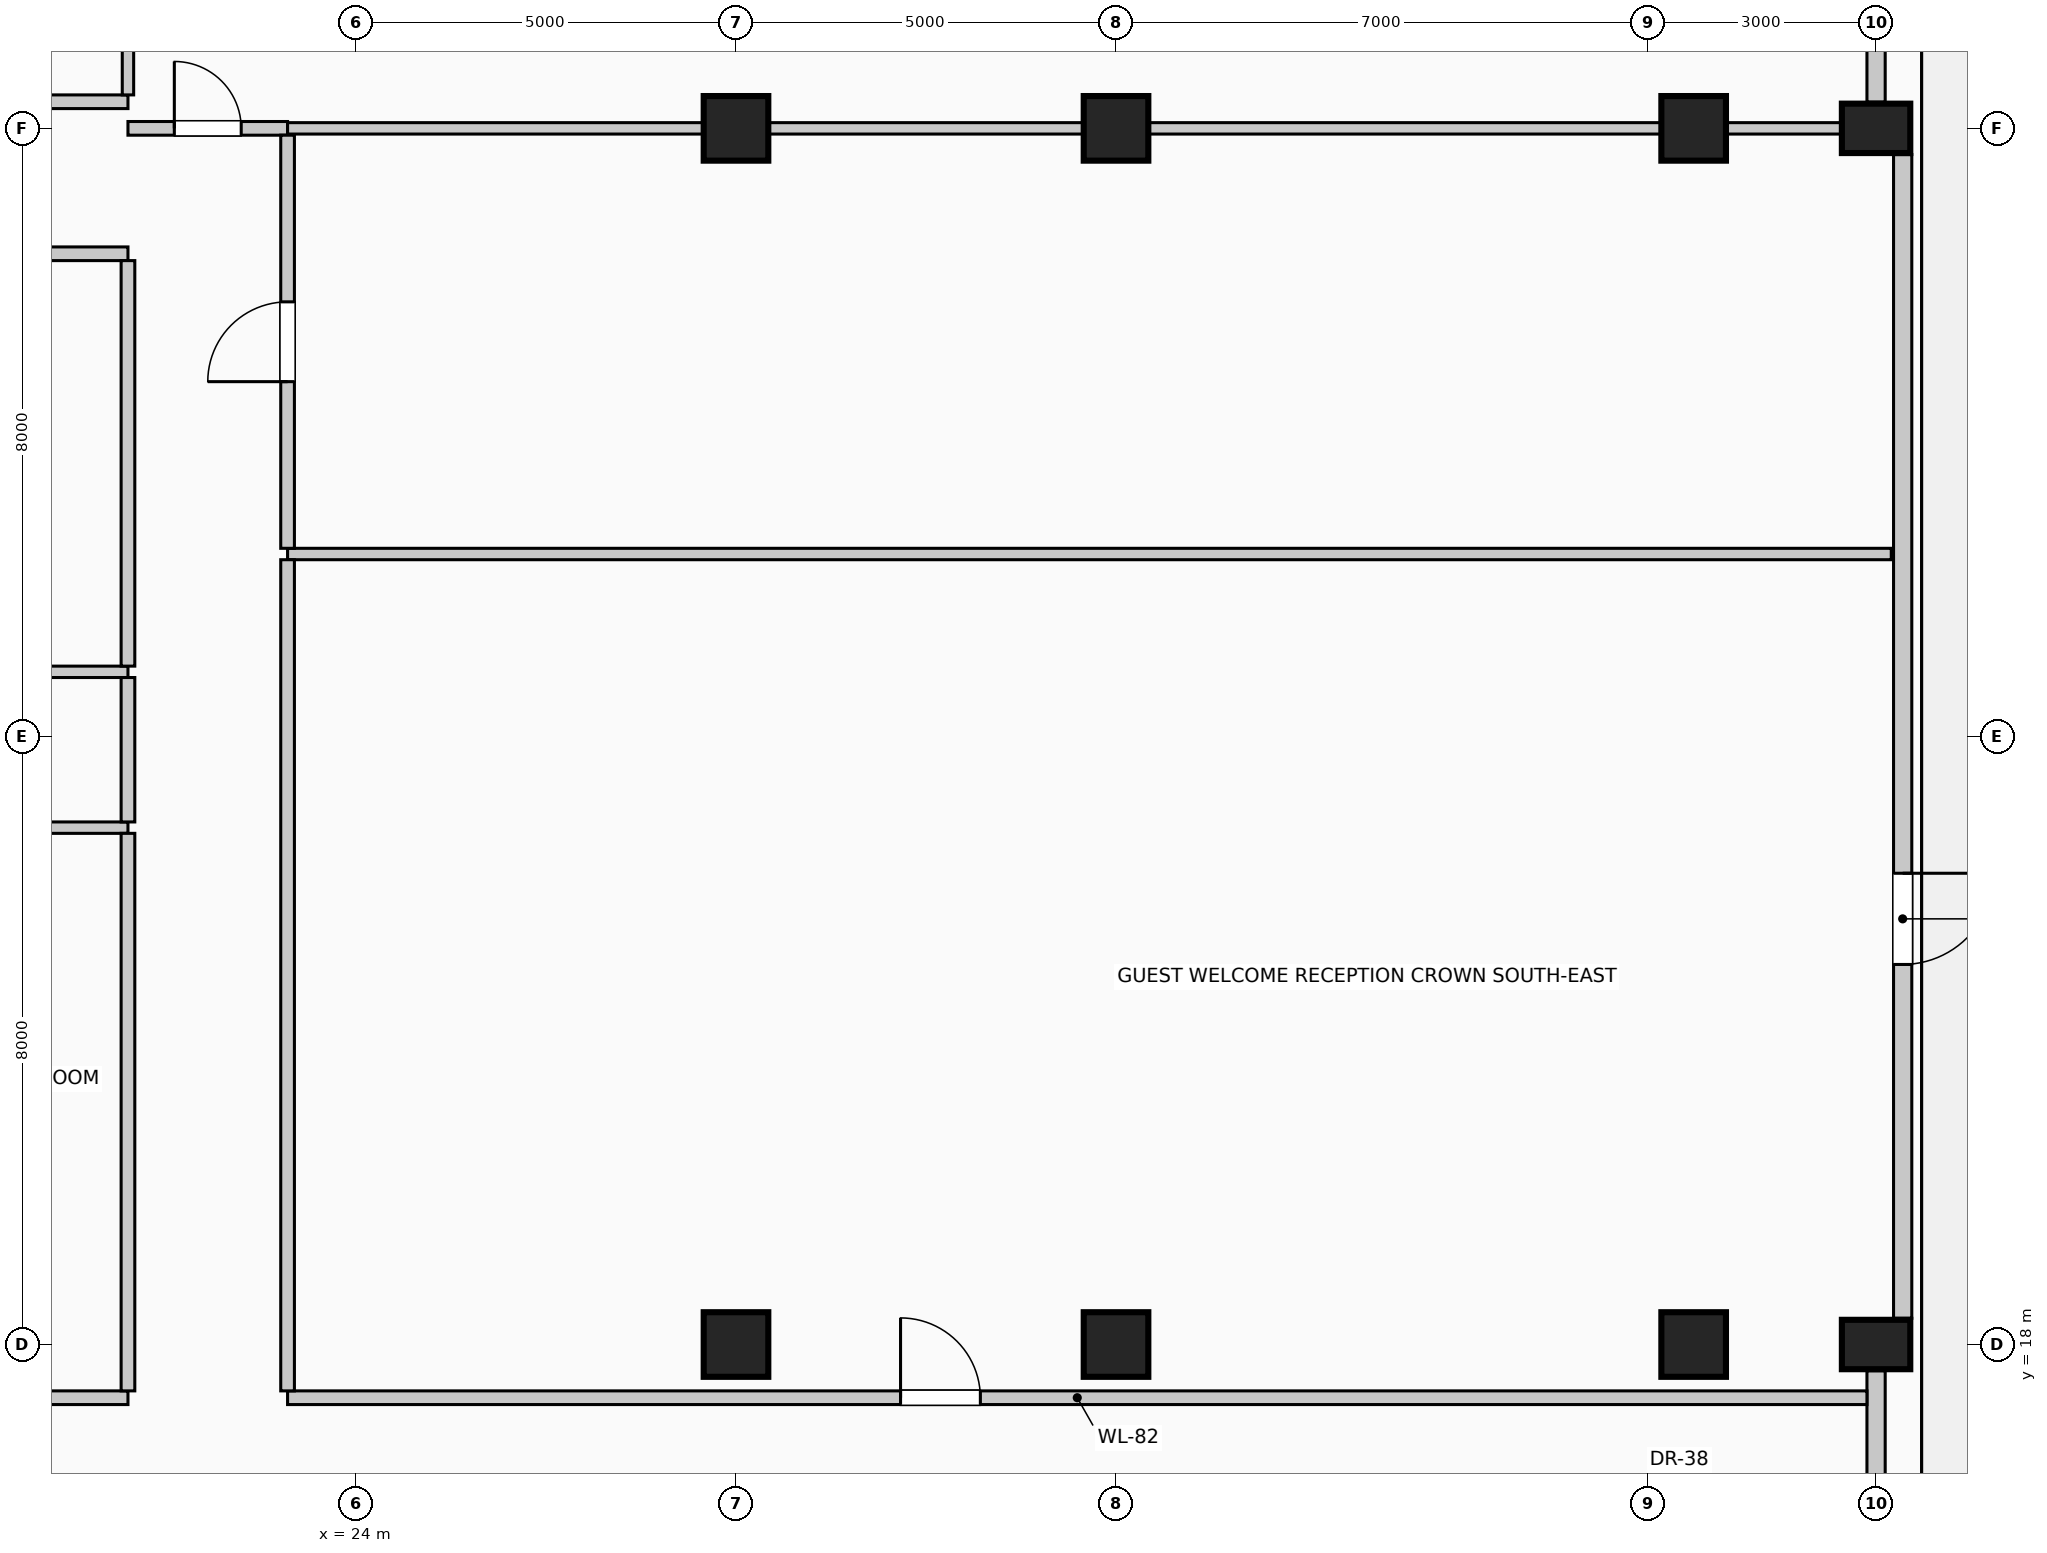
"""IFC4 building model, lengths in metres.
Left out: names, types, materials, properties, quantities, classifications, styles, units other than length and angle.
Written with IfcOpenShell. Run it as: python <this file> out.ifc"""

import sys

from ifc_helpers import new_model, si_unit, direction, frame, frame_2d, origin, origin_2d, place, context, subcontext, project, spatial, rectangle, circle, extrude, element, fill, save


model = new_model("IFC4")
c1 = context("Model", 3, precision=1e-05, world=origin(), true_north=direction((0.0, 1.0)))
c2 = subcontext(c1, "Body", "Model", "MODEL_VIEW")
j1 = project(units=[si_unit("LENGTHUNIT", "METRE"), si_unit("PLANEANGLEUNIT", "RADIAN")], contexts=[c1])
p1 = place(None, origin())
s1 = spatial("IfcSite", under=j1, at=p1, CompositionType="ELEMENT")
p2 = place(p1, origin())
s2 = spatial("IfcBuilding", under=s1, at=p2, CompositionType="ELEMENT")
p3 = place(p2, frame((0.0, 0.0, 289.0)))
s3 = spatial("IfcBuildingStorey", under=s2, at=p3, CompositionType="ELEMENT", Elevation=289.0)
for number, where, z_axis, x_axis in (
    (1, (44.0, 18.0, 0.0), (0.0, 0.0, 1.0), (0.0, 1.0, 0.0)),
    (2, (44.0, 34.0, 0.0), (0.0, 0.0, 1.0), (0.0, 1.0, 0.0)),
):
    element("IfcColumn", number, at=place(p3, frame(where, z_axis=z_axis, x_axis=x_axis)), inside=s3, PredefinedType="COLUMN", context=c2, shape_type="SweptSolid", body=[
        extrude(rectangle(XDim=0.65, YDim=0.9, at=origin_2d()), origin(), (0.0, 0.0, 1.0), 4.0),
    ])
for number, where, z_axis, x_axis in (
    (3, (29.0, 18.0, 0.0), (0.0, 0.0, 1.0), (1.0, 0.0, 0.0)),
    (4, (29.0, 34.0, 0.0), (0.0, 0.0, 1.0), (1.0, 0.0, 0.0)),
    (5, (41.6, 18.0, 0.0), (0.0, 0.0, 1.0), (1.0, 0.0, 0.0)),
    (6, (41.6, 34.0, 0.0), (0.0, 0.0, 1.0), (1.0, 0.0, 0.0)),
    (7, (34.0, 18.0, 0.0), (0.0, 0.0, 1.0), (1.0, 0.0, 0.0)),
    (8, (34.0, 34.0, 0.0), (0.0, 0.0, 1.0), (1.0, 0.0, 0.0)),
):
    element("IfcColumn", number, at=place(p3, frame(where, z_axis=z_axis, x_axis=x_axis)), inside=s3, PredefinedType="COLUMN", context=c2, shape_type="SweptSolid", body=[
        extrude(circle(Radius=0.425, at=origin_2d()), origin(), (0.0, 0.0, 1.0), 4.0),
    ])
p4 = place(p3, frame((44.0, 17.655, 0.0), z_axis=(0.0, 0.0, 1.0), x_axis=(0.0, -1.0, 0.0)))
e9 = element("IfcWall", 9, at=p4, inside=s3, PredefinedType="SOLIDWALL", context=c2, shape_type="SweptSolid", body=[
    extrude(rectangle(XDim=13.71, YDim=0.24, at=frame_2d((6.855, 0.0))), origin(), (0.0, 0.0, 1.0), 3.025),
])
p5 = place(p4, frame((3.17, 0.0, 0.35)))
e10 = element("IfcOpeningElement", 10, at=p5, cuts=e9, PredefinedType="OPENING", context=c2, shape_type="SweptSolid", body=[
    extrude(rectangle(XDim=2.1, YDim=2.2, at=frame_2d((1.05, 1.1))), frame((0.0, 0.13, 0.0), z_axis=(0.0, -1.0, 0.0), x_axis=(1.0, 0.0, 0.0)), (0.0, 0.0, 1.0), 0.26),
])
p6 = place(p4, frame((8.44, 0.0, 0.35)))
e11 = element("IfcOpeningElement", 11, at=p6, cuts=e9, PredefinedType="OPENING", context=c2, shape_type="SweptSolid", body=[
    extrude(rectangle(XDim=2.1, YDim=2.2, at=frame_2d((1.05, 1.1))), frame((0.0, 0.13, 0.0), z_axis=(0.0, -1.0, 0.0), x_axis=(1.0, 0.0, 0.0)), (0.0, 0.0, 1.0), 0.26),
])
p7 = place(p3, frame((44.35, 33.655, 0.0), z_axis=(0.0, 0.0, 1.0), x_axis=(0.0, -1.0, 0.0)))
e12 = element("IfcWall", 12, at=p7, inside=s3, PredefinedType="SOLIDWALL", context=c2, shape_type="SweptSolid", body=[
    extrude(rectangle(XDim=15.31, YDim=0.24, at=frame_2d((7.655, 0.0))), origin(), (0.0, 0.0, 1.0), 3.775),
])
p8 = place(p7, frame((9.455, 0.0, 0.0)))
e13 = element("IfcOpeningElement", 13, at=p8, cuts=e12, PredefinedType="OPENING", context=c2, shape_type="SweptSolid", body=[
    extrude(rectangle(XDim=1.2, YDim=2.25, at=frame_2d((0.6, 1.125))), frame((0.0, 0.13, 0.0), z_axis=(0.0, -1.0, 0.0), x_axis=(1.0, 0.0, 0.0)), (0.0, 0.0, 1.0), 0.26),
])
p9 = place(p3, frame((44.0, 42.055, 0.0), z_axis=(0.0, 0.0, 1.0), x_axis=(0.0, -1.0, 0.0)))
e14 = element("IfcWall", 14, at=p9, inside=s3, PredefinedType="SOLIDWALL", context=c2, shape_type="SweptSolid", body=[
    extrude(rectangle(XDim=7.71, YDim=0.24, at=frame_2d((3.855, 0.0))), origin(), (0.0, 0.0, 1.0), 3.025),
])
p10 = place(p3, frame((15.85, 17.3, 0.0), z_axis=(0.0, 0.0, 1.0), x_axis=(1.0, 0.0, 0.0)))
e15 = element("IfcWall", 15, at=p10, inside=s3, PredefinedType="PARTITIONING", context=c2, shape_type="SweptSolid", body=[
    extrude(rectangle(XDim=5.15, YDim=0.18, at=frame_2d((2.575, 0.0))), origin(), (0.0, 0.0, 1.0), 3.775),
])
p11 = place(p10, frame((2.28, 0.0, 0.0)))
e16 = element("IfcOpeningElement", 16, at=p11, cuts=e15, PredefinedType="OPENING", context=c2, shape_type="SweptSolid", body=[
    extrude(rectangle(XDim=0.95, YDim=2.15, at=frame_2d((0.475, 1.075))), frame((0.0, 0.1, 0.0), z_axis=(0.0, -1.0, 0.0), x_axis=(1.0, 0.0, 0.0)), (0.0, 0.0, 1.0), 0.2),
])
p12 = place(p3, frame((23.1, 17.3, 0.0), z_axis=(0.0, 0.0, 1.0), x_axis=(1.0, 0.0, 0.0)))
e17 = element("IfcWall", 17, at=p12, inside=s3, PredefinedType="PARTITIONING", context=c2, shape_type="SweptSolid", body=[
    extrude(rectangle(XDim=20.78, YDim=0.18, at=frame_2d((10.39, 0.0))), origin(), (0.0, 0.0, 1.0), 3.775),
])
p13 = place(p12, frame((8.065, 0.0, 0.0)))
e18 = element("IfcOpeningElement", 18, at=p13, cuts=e17, PredefinedType="OPENING", context=c2, shape_type="SweptSolid", body=[
    extrude(rectangle(XDim=1.05, YDim=2.15, at=frame_2d((0.525, 1.075))), frame((0.0, 0.1, 0.0), z_axis=(0.0, -1.0, 0.0), x_axis=(1.0, 0.0, 0.0)), (0.0, 0.0, 1.0), 0.2),
])
p14 = place(p3, frame((15.85, 24.8, 0.0), z_axis=(0.0, 0.0, 1.0), x_axis=(1.0, 0.0, 0.0)))
e19 = element("IfcWall", 19, at=p14, inside=s3, PredefinedType="PARTITIONING", context=c2, shape_type="SweptSolid", body=[
    extrude(rectangle(XDim=5.15, YDim=0.15, at=frame_2d((2.575, 0.0))), origin(), (0.0, 0.0, 1.0), 3.775),
])
p15 = place(p3, frame((12.2, 26.85, 0.0), z_axis=(0.0, 0.0, 1.0), x_axis=(1.0, 0.0, 0.0)))
e20 = element("IfcWall", 20, at=p15, inside=s3, PredefinedType="PARTITIONING", context=c2, shape_type="SweptSolid", body=[
    extrude(rectangle(XDim=8.8, YDim=0.15, at=frame_2d((4.4, 0.0))), origin(), (0.0, 0.0, 1.0), 3.775),
])
p16 = place(p3, frame((23.1, 28.4, 0.0), z_axis=(0.0, 0.0, 1.0), x_axis=(1.0, 0.0, 0.0)))
e21 = element("IfcWall", 21, at=p16, inside=s3, PredefinedType="PARTITIONING", context=c2, shape_type="SweptSolid", body=[
    extrude(rectangle(XDim=21.1, YDim=0.15, at=frame_2d((10.55, 0.0))), origin(), (0.0, 0.0, 1.0), 3.775),
])
p17 = place(p3, frame((15.85, 32.35, 0.0), z_axis=(0.0, 0.0, 1.0), x_axis=(1.0, 0.0, 0.0)))
e22 = element("IfcWall", 22, at=p17, inside=s3, PredefinedType="PARTITIONING", context=c2, shape_type="SweptSolid", body=[
    extrude(rectangle(XDim=5.15, YDim=0.18, at=frame_2d((2.575, 0.0))), origin(), (0.0, 0.0, 1.0), 3.775),
])
p18 = place(p3, frame((21.0, 34.0, 0.0), z_axis=(0.0, 0.0, 1.0), x_axis=(1.0, 0.0, 0.0)))
e23 = element("IfcWall", 23, at=p18, inside=s3, PredefinedType="PARTITIONING", context=c2, shape_type="SweptSolid", body=[
    extrude(rectangle(XDim=2.1, YDim=0.18, at=frame_2d((1.05, 0.0))), origin(), (0.0, 0.0, 1.0), 3.27),
])
p19 = place(p18, frame((0.61, 0.0, 0.0)))
e24 = element("IfcOpeningElement", 24, at=p19, cuts=e23, PredefinedType="OPENING", context=c2, shape_type="SweptSolid", body=[
    extrude(rectangle(XDim=0.88, YDim=2.1, at=frame_2d((0.44, 1.05))), frame((0.0, 0.1, 0.0), z_axis=(0.0, -1.0, 0.0), x_axis=(1.0, 0.0, 0.0)), (0.0, 0.0, 1.0), 0.2),
])
p20 = place(p3, frame((23.1, 34.0, 0.0), z_axis=(0.0, 0.0, 1.0), x_axis=(1.0, 0.0, 0.0)))
e25 = element("IfcWall", 25, at=p20, inside=s3, PredefinedType="PARTITIONING", context=c2, shape_type="SweptSolid", body=[
    extrude(rectangle(XDim=5.475, YDim=0.15, at=frame_2d((2.737, 0.0))), origin(), (0.0, 0.0, 1.0), 3.27),
])
p21 = place(p3, frame((29.425, 34.0, 0.0), z_axis=(0.0, 0.0, 1.0), x_axis=(1.0, 0.0, 0.0)))
e26 = element("IfcWall", 26, at=p21, inside=s3, PredefinedType="PARTITIONING", context=c2, shape_type="SweptSolid", body=[
    extrude(rectangle(XDim=4.15, YDim=0.15, at=frame_2d((2.075, 0.0))), origin(), (0.0, 0.0, 1.0), 3.27),
])
p22 = place(p3, frame((34.425, 34.0, 0.0), z_axis=(0.0, 0.0, 1.0), x_axis=(1.0, 0.0, 0.0)))
e27 = element("IfcWall", 27, at=p22, inside=s3, PredefinedType="PARTITIONING", context=c2, shape_type="SweptSolid", body=[
    extrude(rectangle(XDim=6.75, YDim=0.15, at=frame_2d((3.375, 0.0))), origin(), (0.0, 0.0, 1.0), 3.27),
])
p23 = place(p3, frame((42.025, 34.0, 0.0), z_axis=(0.0, 0.0, 1.0), x_axis=(1.0, 0.0, 0.0)))
e28 = element("IfcWall", 28, at=p23, inside=s3, PredefinedType="PARTITIONING", context=c2, shape_type="SweptSolid", body=[
    extrude(rectangle(XDim=1.525, YDim=0.15, at=frame_2d((0.763, 0.0))), origin(), (0.0, 0.0, 1.0), 3.27),
])
p24 = place(p3, frame((17.0, 34.35, 0.0), z_axis=(0.0, 0.0, 1.0), x_axis=(1.0, 0.0, 0.0)))
e29 = element("IfcWall", 29, at=p24, inside=s3, PredefinedType="PARTITIONING", context=c2, shape_type="SweptSolid", body=[
    extrude(rectangle(XDim=4.0, YDim=0.18, at=frame_2d((2.0, 0.0))), origin(), (0.0, 0.0, 1.0), 3.775),
])
p25 = place(p24, frame((1.475, 0.0, 0.0)))
e30 = element("IfcOpeningElement", 30, at=p25, cuts=e29, PredefinedType="OPENING", context=c2, shape_type="SweptSolid", body=[
    extrude(rectangle(XDim=1.05, YDim=2.15, at=frame_2d((0.525, 1.075))), frame((0.0, 0.1, 0.0), z_axis=(0.0, -1.0, 0.0), x_axis=(1.0, 0.0, 0.0)), (0.0, 0.0, 1.0), 0.2),
])
p26 = place(p3, frame((21.0, 17.39, 0.0), z_axis=(0.0, 0.0, 1.0), x_axis=(0.0, 1.0, 0.0)))
e31 = element("IfcWall", 31, at=p26, inside=s3, PredefinedType="PARTITIONING", context=c2, shape_type="SweptSolid", body=[
    extrude(rectangle(XDim=7.335, YDim=0.18, at=frame_2d((3.667, 0.0))), origin(), (0.0, 0.0, 1.0), 3.775),
])
p27 = place(p3, frame((21.0, 24.875, 0.0), z_axis=(0.0, 0.0, 1.0), x_axis=(0.0, 1.0, 0.0)))
e32 = element("IfcWall", 32, at=p27, inside=s3, PredefinedType="PARTITIONING", context=c2, shape_type="SweptSolid", body=[
    extrude(rectangle(XDim=1.9, YDim=0.18, at=frame_2d((0.95, 0.0))), origin(), (0.0, 0.0, 1.0), 3.775),
])
p28 = place(p3, frame((21.0, 26.925, 0.0), z_axis=(0.0, 0.0, 1.0), x_axis=(0.0, 1.0, 0.0)))
e33 = element("IfcWall", 33, at=p28, inside=s3, PredefinedType="PARTITIONING", context=c2, shape_type="SweptSolid", body=[
    extrude(rectangle(XDim=5.335, YDim=0.18, at=frame_2d((2.667, 0.0))), origin(), (0.0, 0.0, 1.0), 3.775),
])
p29 = place(p3, frame((21.0, 34.44, 0.0), z_axis=(0.0, 0.0, 1.0), x_axis=(0.0, 1.0, 0.0)))
e34 = element("IfcWall", 34, at=p29, inside=s3, PredefinedType="PARTITIONING", context=c2, shape_type="SweptSolid", body=[
    extrude(rectangle(XDim=10.84, YDim=0.15, at=frame_2d((5.42, 0.0))), origin(), (0.0, 0.0, 1.0), 3.775),
])
p30 = place(p3, frame((23.1, 17.39, 0.0), z_axis=(0.0, 0.0, 1.0), x_axis=(0.0, 1.0, 0.0)))
e35 = element("IfcWall", 35, at=p30, inside=s3, PredefinedType="PARTITIONING", context=c2, shape_type="SweptSolid", body=[
    extrude(rectangle(XDim=10.935, YDim=0.18, at=frame_2d((5.468, 0.0))), origin(), (0.0, 0.0, 1.0), 3.775),
])
p31 = place(p3, frame((23.1, 28.475, 0.0), z_axis=(0.0, 0.0, 1.0), x_axis=(0.0, 1.0, 0.0)))
e36 = element("IfcWall", 36, at=p31, inside=s3, PredefinedType="PARTITIONING", context=c2, shape_type="SweptSolid", body=[
    extrude(rectangle(XDim=5.435, YDim=0.18, at=frame_2d((2.717, 0.0))), origin(), (0.0, 0.0, 1.0), 3.775),
])
p32 = place(p31, frame((2.192, 0.0, 0.0)))
e37 = element("IfcOpeningElement", 37, at=p32, cuts=e36, PredefinedType="OPENING", context=c2, shape_type="SweptSolid", body=[
    extrude(rectangle(XDim=1.05, YDim=2.15, at=frame_2d((0.525, 1.075))), frame((0.0, 0.1, 0.0), z_axis=(0.0, -1.0, 0.0), x_axis=(1.0, 0.0, 0.0)), (0.0, 0.0, 1.0), 0.2),
])
p33 = place(p8, origin())
e38 = element("IfcDoor", 38, at=p33, inside=s3, OperationType="SINGLE_SWING_LEFT", PredefinedType="DOOR", context=c2, shape_type="SweptSolid", body=[
    extrude(rectangle(XDim=1.2, YDim=2.25, at=frame_2d((0.6, 1.125))), frame((0.0, 0.025, 0.0), z_axis=(0.0, -1.0, 0.0), x_axis=(1.0, 0.0, 0.0)), (0.0, 0.0, 1.0), 0.05),
])
fill(e13, e38)
p34 = place(p13, origin())
e39 = element("IfcDoor", 39, at=p34, inside=s3, OperationType="SINGLE_SWING_LEFT", PredefinedType="DOOR", context=c2, shape_type="SweptSolid", body=[
    extrude(rectangle(XDim=1.05, YDim=2.15, at=frame_2d((0.525, 1.075))), frame((0.0, 0.025, 0.0), z_axis=(0.0, -1.0, 0.0), x_axis=(1.0, 0.0, 0.0)), (0.0, 0.0, 1.0), 0.05),
])
fill(e18, e39)
p35 = place(p19, origin())
e40 = element("IfcDoor", 40, at=p35, inside=s3, OperationType="SINGLE_SWING_LEFT", PredefinedType="DOOR", context=c2, shape_type="SweptSolid", body=[
    extrude(rectangle(XDim=0.88, YDim=2.1, at=frame_2d((0.44, 1.05))), frame((0.0, 0.025, 0.0), z_axis=(0.0, -1.0, 0.0), x_axis=(1.0, 0.0, 0.0)), (0.0, 0.0, 1.0), 0.05),
])
fill(e24, e40)
p36 = place(p32, origin())
e41 = element("IfcDoor", 41, at=p36, inside=s3, OperationType="SINGLE_SWING_LEFT", PredefinedType="DOOR", context=c2, shape_type="SweptSolid", body=[
    extrude(rectangle(XDim=1.05, YDim=2.15, at=frame_2d((0.525, 1.075))), frame((0.0, 0.025, 0.0), z_axis=(0.0, -1.0, 0.0), x_axis=(1.0, 0.0, 0.0)), (0.0, 0.0, 1.0), 0.05),
])
fill(e37, e41)
save(model, sys.argv[1])
